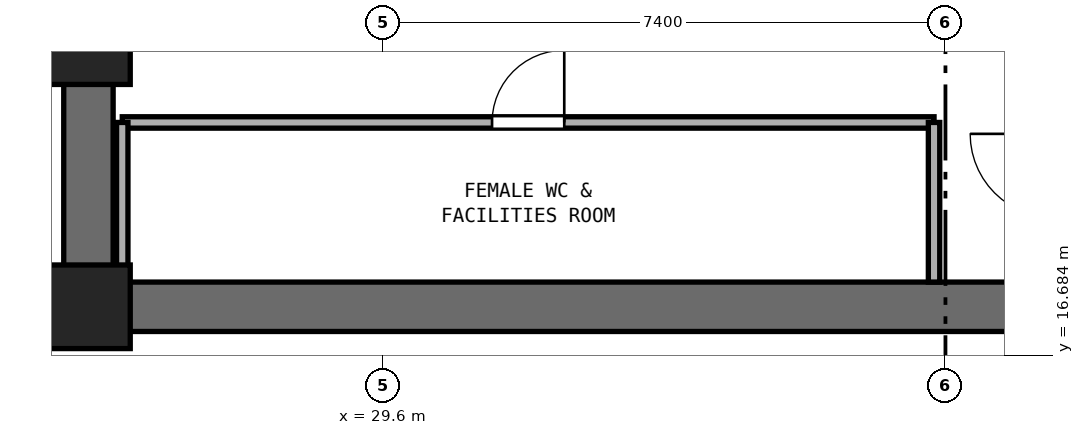
"""IFC4 building model, lengths in metres.
Left out: names, types, materials, properties, quantities, classifications, styles, units other than length and angle.
Written with IfcOpenShell. Run it as: python <this file> out.ifc"""

import sys

from ifc_helpers import new_model, si_unit, direction, frame, frame_2d, origin, origin_2d, place, context, subcontext, project, spatial, rectangle, extrude, element, fill, save


model = new_model("IFC4")
c1 = context("Model", 3, precision=1e-05, world=origin(), true_north=direction((0.0, 1.0)))
c2 = subcontext(c1, "Body", "Model", "MODEL_VIEW")
j1 = project(units=[si_unit("LENGTHUNIT", "METRE"), si_unit("PLANEANGLEUNIT", "RADIAN")], contexts=[c1])
p1 = place(None, origin())
s1 = spatial("IfcSite", under=j1, at=p1, CompositionType="ELEMENT")
p2 = place(p1, origin())
s2 = spatial("IfcBuilding", under=s1, at=p2, CompositionType="ELEMENT")
p3 = place(p2, frame((0.0, 0.0, 47.8)))
s3 = spatial("IfcBuildingStorey", under=s2, at=p3, CompositionType="ELEMENT", Elevation=47.8)
p4 = place(p3, frame((25.4, 17.325, 0.0), z_axis=(0.0, 0.0, 1.0), x_axis=(1.0, 0.0, 0.0)))
e1 = element("IfcWall", 1, at=p4, inside=s3, PredefinedType="SHEAR", context=c2, shape_type="SweptSolid", body=[
    extrude(rectangle(XDim=23.2, YDim=0.65, at=frame_2d((11.6, 0.0))), origin(), (0.0, 0.0, 1.0), 3.525),
])
p5 = place(p3, frame((25.725, 17.65, 0.0), z_axis=(0.0, 0.0, 1.0), x_axis=(0.0, 1.0, 0.0)))
e2 = element("IfcWall", 2, at=p5, inside=s3, PredefinedType="SHEAR", context=c2, shape_type="SweptSolid", body=[
    extrude(rectangle(XDim=15.1, YDim=0.65, at=frame_2d((7.55, 0.0))), origin(), (0.0, 0.0, 1.0), 3.525),
])
p6 = place(p5, frame((6.8, 0.0, 0.0)))
e3 = element("IfcOpeningElement", 3, at=p6, cuts=e2, PredefinedType="OPENING", context=c2, shape_type="SweptSolid", body=[
    extrude(rectangle(XDim=1.5, YDim=2.15, at=frame_2d((0.75, 1.075))), frame((0.0, 0.335, 0.0), z_axis=(0.0, -1.0, 0.0), x_axis=(1.0, 0.0, 0.0)), (0.0, 0.0, 1.0), 0.67),
])
for number, where, z_axis, x_axis in (
    (4, (25.725, 17.325, 0.0), (0.0, 0.0, 1.0), (1.0, 0.0, 0.0)),
    (5, (25.725, 20.8, 0.0), (0.0, 0.0, 1.0), (1.0, 0.0, 0.0)),
):
    element("IfcColumn", number, at=place(p3, frame(where, z_axis=z_axis, x_axis=x_axis)), inside=s3, PredefinedType="PILASTER", context=c2, shape_type="SweptSolid", body=[
        extrude(rectangle(XDim=1.1, YDim=1.1, at=origin_2d()), origin(), (0.0, 0.0, 1.0), 3.8),
    ])
p7 = place(p3, frame((26.17, 19.75, 0.0), z_axis=(0.0, 0.0, 1.0), x_axis=(1.0, 0.0, 0.0)))
e6 = element("IfcWall", 6, at=p7, inside=s3, PredefinedType="PARTITIONING", context=c2, shape_type="SweptSolid", body=[
    extrude(rectangle(XDim=10.68, YDim=0.15, at=frame_2d((5.34, 0.0))), origin(), (0.0, 0.0, 1.0), 3.525),
])
p8 = place(p7, frame((4.865, 0.0, 0.0)))
e7 = element("IfcOpeningElement", 7, at=p8, cuts=e6, PredefinedType="OPENING", context=c2, shape_type="SweptSolid", body=[
    extrude(rectangle(XDim=0.95, YDim=2.1, at=frame_2d((0.475, 1.05))), frame((0.0, 0.085, 0.0), z_axis=(0.0, -1.0, 0.0), x_axis=(1.0, 0.0, 0.0)), (0.0, 0.0, 1.0), 0.17),
])
for number, where, z_axis, x_axis in (
    (8, (26.17, 17.65, 0.0), (0.0, 0.0, 1.0), (0.0, 1.0, 0.0)),
    (9, (36.85, 17.65, 0.0), (0.0, 0.0, 1.0), (0.0, 1.0, 0.0)),
):
    element("IfcWall", number, at=place(p3, frame(where, z_axis=z_axis, x_axis=x_axis)), inside=s3, PredefinedType="PARTITIONING", context=c2, shape_type="SweptSolid", body=[
        extrude(rectangle(XDim=2.1, YDim=0.15, at=frame_2d((1.05, 0.0))), origin(), (0.0, 0.0, 1.0), 3.525),
    ])
p9 = place(p8, origin())
e10 = element("IfcDoor", 10, at=p9, inside=s3, OperationType="SINGLE_SWING_RIGHT", PredefinedType="DOOR", context=c2, shape_type="SweptSolid", body=[
    extrude(rectangle(XDim=0.95, YDim=2.1, at=frame_2d((0.475, 1.05))), frame((0.0, 0.025, 0.0), z_axis=(0.0, -1.0, 0.0), x_axis=(1.0, 0.0, 0.0)), (0.0, 0.0, 1.0), 0.05),
])
fill(e7, e10)
save(model, sys.argv[1])
